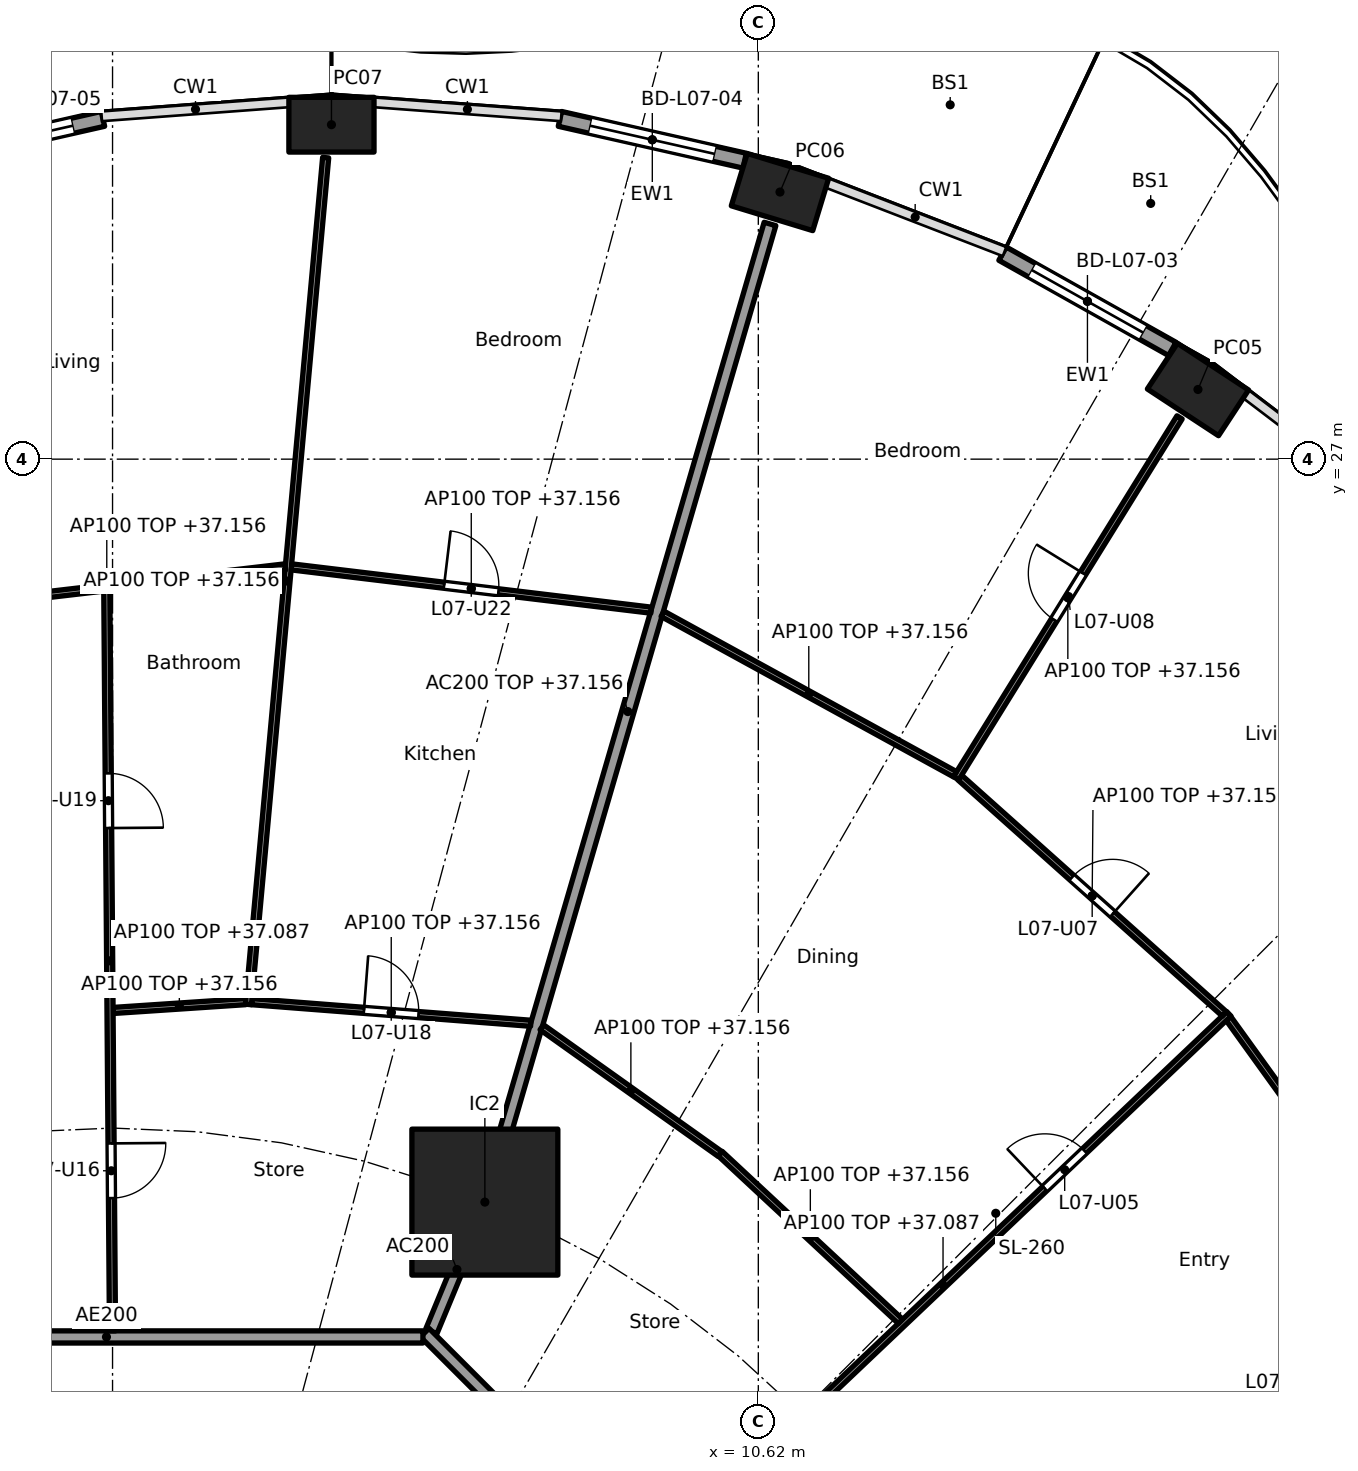
"""IFC4 building model, lengths in metres.
Left out: names, types, materials, properties, quantities, classifications, styles, units other than length and angle.
Written with IfcOpenShell. Run it as: python <this file> out.ifc"""

import sys

from ifc_helpers import new_model, si_unit, direction, frame, frame_2d, origin, origin_2d, place, context, subcontext, project, spatial, rectangle, hollow_rectangle, extrude, element, fill, save


model = new_model("IFC4")
c1 = context("Model", 3, precision=1e-05, world=origin(), true_north=direction((0.0, 1.0)))
c2 = subcontext(c1, "Body", "Model", "MODEL_VIEW")
j1 = project(units=[si_unit("LENGTHUNIT", "METRE"), si_unit("PLANEANGLEUNIT", "RADIAN")], contexts=[c1])
p1 = place(None, origin())
s1 = spatial("IfcSite", under=j1, at=p1, CompositionType="ELEMENT")
p2 = place(p1, origin())
s2 = spatial("IfcBuilding", under=s1, at=p2, CompositionType="ELEMENT")
p3 = place(p2, frame((0.0, 0.0, 34.4)))
s3 = spatial("IfcBuildingStorey", under=s2, at=p3, CompositionType="ELEMENT", Elevation=34.4)
for number, where, z_axis, x_axis in (
    (1, (17.85, 28.146, 0.0), (0.0, 0.0, 1.0), (-0.836, 0.549, 0.0)),
    (2, (10.976, 31.393, 0.0), (0.0, 0.0, 1.0), (-0.957, 0.292, 0.0)),
    (3, (3.6, 32.5, 0.0), (0.0, 0.0, 1.0), (-1.0, 0.0, 0.0)),
):
    element("IfcColumn", number, at=place(p3, frame(where, z_axis=z_axis, x_axis=x_axis)), inside=s3, PredefinedType="COLUMN", context=c2, shape_type="SweptSolid", body=[
        extrude(hollow_rectangle(XDim=1.4, YDim=0.9, WallThickness=0.05, at=origin_2d()), origin(), (0.0, 0.0, 1.0), 3.7),
    ])
p4 = place(p3, frame((6.123, 14.782, 0.0), z_axis=(0.0, 0.0, 1.0), x_axis=(1.0, 0.0, 0.0)))
e4 = element("IfcColumn", 4, at=p4, inside=s3, PredefinedType="COLUMN", context=c2, shape_type="SweptSolid", body=[
    extrude(rectangle(XDim=2.4, YDim=2.4, at=origin_2d()), origin(), (0.0, 0.0, 1.0), 3.7),
])
p5 = place(p3, frame((14.637, 30.379, 0.0), z_axis=(0.0, 0.0, 1.0), x_axis=(0.872102558443, -0.489323132048, 0.0)))
e5 = element("IfcWall", 5, at=p5, inside=s3, PredefinedType="SOLIDWALL", context=c2, shape_type="SweptSolid", body=[
    extrude(rectangle(XDim=3.201, YDim=0.25, at=frame_2d((1.601, 0.0))), origin(), (0.0, 0.0, 1.0), 3.44),
])
p6 = place(p5, frame((0.551, 0.0, 0.0)))
e6 = element("IfcOpeningElement", 6, at=p6, cuts=e5, PredefinedType="OPENING", context=c2, shape_type="SweptSolid", body=[
    extrude(rectangle(XDim=2.1, YDim=2.4, at=frame_2d((1.05, 1.2))), frame((0.0, 0.135, 0.0), z_axis=(0.0, -1.0, 0.0), x_axis=(1.0, 0.0, 0.0)), (0.0, 0.0, 1.0), 0.27),
])
p7 = place(p3, frame((7.358, 32.596, 0.0), z_axis=(0.0, 0.0, 1.0), x_axis=(0.97533495413, -0.220729987208, 0.0)))
e7 = element("IfcWall", 7, at=p7, inside=s3, PredefinedType="SOLIDWALL", context=c2, shape_type="SweptSolid", body=[
    extrude(rectangle(XDim=3.115, YDim=0.25, at=frame_2d((1.557, 0.0))), origin(), (0.0, 0.0, 1.0), 3.44),
])
p8 = place(p7, frame((0.507, 0.0, 0.0)))
e8 = element("IfcOpeningElement", 8, at=p8, cuts=e7, PredefinedType="OPENING", context=c2, shape_type="SweptSolid", body=[
    extrude(rectangle(XDim=2.1, YDim=2.4, at=frame_2d((1.05, 1.2))), frame((0.0, 0.135, 0.0), z_axis=(0.0, -1.0, 0.0), x_axis=(1.0, 0.0, 0.0)), (0.0, 0.0, 1.0), 0.27),
])
p9 = place(p3, frame((-3.195, 31.908, 0.0), z_axis=(0.0, 0.0, 1.0), x_axis=(0.975331134677, 0.220746863466, 0.0)))
e9 = element("IfcWall", 9, at=p9, inside=s3, PredefinedType="SOLIDWALL", context=c2, shape_type="SweptSolid", body=[
    extrude(rectangle(XDim=3.115, YDim=0.25, at=frame_2d((1.557, 0.0))), origin(), (0.0, 0.0, 1.0), 3.44),
])
p10 = place(p9, frame((0.507, 0.0, 0.0)))
e10 = element("IfcOpeningElement", 10, at=p10, cuts=e9, PredefinedType="OPENING", context=c2, shape_type="SweptSolid", body=[
    extrude(rectangle(XDim=2.1, YDim=2.4, at=frame_2d((1.05, 1.2))), frame((0.0, 0.135, 0.0), z_axis=(0.0, -1.0, 0.0), x_axis=(1.0, 0.0, 0.0)), (0.0, 0.0, 1.0), 0.27),
])
p11 = place(p3, frame((5.243, 12.657, 0.0), z_axis=(0.0, 0.0, 1.0), x_axis=(0.382707856524, 0.923869415315, 0.0)))
e11 = element("IfcWall", 11, at=p11, inside=s3, PredefinedType="PARTITIONING", context=c2, shape_type="SweptSolid", body=[
    extrude(rectangle(XDim=2.2, YDim=0.2, at=frame_2d((1.1, 0.0))), origin(), (0.0, 0.0, 1.0), 3.44),
])
p12 = place(p3, frame((6.137, 14.83, 0.0), z_axis=(0.0, 0.0, 1.0), x_axis=(0.27985745069, 0.960041565399, 0.0)))
e12 = element("IfcWall", 12, at=p12, inside=s3, PredefinedType="PARTITIONING", context=c2, shape_type="SweptSolid", body=[
    extrude(rectangle(XDim=16.705, YDim=0.2, at=frame_2d((8.353, 0.0))), origin(), (0.0, 0.0, 1.0), 2.756),
])
p13 = place(p3, frame((12.635, 5.134, 0.0), z_axis=(0.0, 0.0, 1.0), x_axis=(-0.707106781187, 0.707106781187, 0.0)))
e13 = element("IfcWall", 13, at=p13, inside=s3, PredefinedType="PARTITIONING", context=c2, shape_type="SweptSolid", body=[
    extrude(rectangle(XDim=10.609, YDim=0.2, at=frame_2d((5.305, 0.0))), origin(), (0.0, 0.0, 1.0), 3.44),
])
p14 = place(p13, frame((3.503, 0.0, 0.0)))
e14 = element("IfcOpeningElement", 14, at=p14, cuts=e13, PredefinedType="OPENING", context=c2, shape_type="SweptSolid", body=[
    extrude(rectangle(XDim=1.0, YDim=2.1, at=frame_2d((0.5, 1.05))), frame((0.0, 0.11, 0.0), z_axis=(0.0, -1.0, 0.0), x_axis=(1.0, 0.0, 0.0)), (0.0, 0.0, 1.0), 0.22),
])
p15 = place(p3, frame((5.104, 12.565, 0.0), z_axis=(0.0, 0.0, 1.0), x_axis=(-1.0, 0.0, 0.0)))
e15 = element("IfcWall", 15, at=p15, inside=s3, PredefinedType="PARTITIONING", context=c2, shape_type="SweptSolid", body=[
    extrude(rectangle(XDim=10.409, YDim=0.2, at=frame_2d((5.205, 0.0))), origin(), (0.0, 0.0, 1.0), 3.44),
])
p16 = place(p15, frame((6.339, 0.0, 0.0)))
e16 = element("IfcOpeningElement", 16, at=p16, cuts=e15, PredefinedType="OPENING", context=c2, shape_type="SweptSolid", body=[
    extrude(rectangle(XDim=1.0, YDim=2.1, at=frame_2d((0.5, 1.05))), frame((0.0, 0.11, 0.0), z_axis=(0.0, -1.0, 0.0), x_axis=(1.0, 0.0, 0.0)), (0.0, 0.0, 1.0), 0.22),
])
p17 = place(p3, frame((16.635, 8.078, 0.0), z_axis=(0.0, 0.0, 1.0), x_axis=(0.949412285442, 0.314032342684, 0.0)))
e17 = element("IfcWall", 17, at=p17, inside=s3, PredefinedType="PARTITIONING", context=c2, shape_type="SweptSolid", body=[
    extrude(rectangle(XDim=14.451, YDim=0.1, at=frame_2d((7.226, 0.0))), origin(), (0.0, 0.0, 1.0), 2.837),
])
p18 = place(p3, frame((10.813, 7.091, 0.0), z_axis=(0.0, 0.0, 1.0), x_axis=(0.885182649479, 0.465243674928, 0.0)))
e18 = element("IfcWall", 18, at=p18, inside=s3, PredefinedType="PARTITIONING", context=c2, shape_type="SweptSolid", body=[
    extrude(rectangle(XDim=12.551, YDim=0.1, at=frame_2d((6.275, 0.0))), origin(), (0.0, 0.0, 1.0), 2.687),
])
p19 = place(p18, frame((0.539, 0.0, 0.0)))
e19 = element("IfcOpeningElement", 19, at=p19, cuts=e18, PredefinedType="OPENING", context=c2, shape_type="SweptSolid", body=[
    extrude(rectangle(XDim=0.9, YDim=2.1, at=frame_2d((0.45, 1.05))), frame((0.0, 0.06, 0.0), z_axis=(0.0, -1.0, 0.0), x_axis=(1.0, 0.0, 0.0)), (0.0, 0.0, 1.0), 0.12),
])
p20 = place(p18, frame((8.494, 0.0, 0.0)))
e20 = element("IfcOpeningElement", 20, at=p20, cuts=e18, PredefinedType="OPENING", context=c2, shape_type="SweptSolid", body=[
    extrude(rectangle(XDim=0.9, YDim=2.1, at=frame_2d((0.45, 1.05))), frame((0.0, 0.06, 0.0), z_axis=(0.0, -1.0, 0.0), x_axis=(1.0, 0.0, 0.0)), (0.0, 0.0, 1.0), 0.12),
])
p21 = place(p3, frame((21.849, 12.948, 0.0), z_axis=(0.0, 0.0, 1.0), x_axis=(-0.584563700282, 0.811347817099, 0.0)))
e21 = element("IfcWall", 21, at=p21, inside=s3, PredefinedType="PARTITIONING", context=c2, shape_type="SweptSolid", body=[
    extrude(rectangle(XDim=5.984, YDim=0.1, at=frame_2d((2.992, 0.0))), origin(), (0.0, 0.0, 1.0), 2.756),
])
p22 = place(p21, frame((1.046, 0.0, 0.0)))
e22 = element("IfcOpeningElement", 22, at=p22, cuts=e21, PredefinedType="OPENING", context=c2, shape_type="SweptSolid", body=[
    extrude(rectangle(XDim=0.9, YDim=2.1, at=frame_2d((0.45, 1.05))), frame((0.0, 0.06, 0.0), z_axis=(0.0, -1.0, 0.0), x_axis=(1.0, 0.0, 0.0)), (0.0, 0.0, 1.0), 0.12),
])
p23 = place(p3, frame((8.957, 8.953, 0.0), z_axis=(0.0, 0.0, 1.0), x_axis=(0.725250022034, 0.688485588476, 0.0)))
e23 = element("IfcWall", 23, at=p23, inside=s3, PredefinedType="PARTITIONING", context=c2, shape_type="SweptSolid", body=[
    extrude(rectangle(XDim=12.963, YDim=0.1, at=frame_2d((6.481, 0.0))), origin(), (0.0, 0.0, 1.0), 2.687),
])
p24 = place(p23, frame((2.333, 0.0, 0.0)))
e24 = element("IfcOpeningElement", 24, at=p24, cuts=e23, PredefinedType="OPENING", context=c2, shape_type="SweptSolid", body=[
    extrude(rectangle(XDim=0.9, YDim=2.1, at=frame_2d((0.45, 1.05))), frame((0.0, 0.06, 0.0), z_axis=(0.0, -1.0, 0.0), x_axis=(1.0, 0.0, 0.0)), (0.0, 0.0, 1.0), 0.12),
])
p25 = place(p23, frame((8.79, 0.0, 0.0)))
e25 = element("IfcOpeningElement", 25, at=p25, cuts=e23, PredefinedType="OPENING", context=c2, shape_type="SweptSolid", body=[
    extrude(rectangle(XDim=0.9, YDim=2.1, at=frame_2d((0.45, 1.05))), frame((0.0, 0.06, 0.0), z_axis=(0.0, -1.0, 0.0), x_axis=(1.0, 0.0, 0.0)), (0.0, 0.0, 1.0), 0.12),
])
p26 = place(p3, frame((12.958, 12.82, 0.0), z_axis=(0.0, 0.0, 1.0), x_axis=(-0.732028724098, 0.681273768096, 0.0)))
e26 = element("IfcWall", 26, at=p26, inside=s3, PredefinedType="PARTITIONING", context=c2, shape_type="SweptSolid", body=[
    extrude(rectangle(XDim=4.05, YDim=0.1, at=frame_2d((2.025, 0.0))), origin(), (0.0, 0.0, 1.0), 2.756),
])
p27 = place(p3, frame((18.285, 17.877, 0.0), z_axis=(0.0, 0.0, 1.0), x_axis=(-0.745806142791, 0.666163041136, 0.0)))
e27 = element("IfcWall", 27, at=p27, inside=s3, PredefinedType="PARTITIONING", context=c2, shape_type="SweptSolid", body=[
    extrude(rectangle(XDim=5.831, YDim=0.1, at=frame_2d((2.915, 0.0))), origin(), (0.0, 0.0, 1.0), 2.756),
])
p28 = place(p27, frame((2.465, 0.0, 0.0)))
e28 = element("IfcOpeningElement", 28, at=p28, cuts=e27, PredefinedType="OPENING", context=c2, shape_type="SweptSolid", body=[
    extrude(rectangle(XDim=0.9, YDim=2.1, at=frame_2d((0.45, 1.05))), frame((0.0, 0.06, 0.0), z_axis=(0.0, -1.0, 0.0), x_axis=(1.0, 0.0, 0.0)), (0.0, 0.0, 1.0), 0.12),
])
p29 = place(p3, frame((9.989, 15.574, 0.0), z_axis=(0.0, 0.0, 1.0), x_axis=(-0.81492039338, 0.57957290521, 0.0)))
e29 = element("IfcWall", 29, at=p29, inside=s3, PredefinedType="PARTITIONING", context=c2, shape_type="SweptSolid", body=[
    extrude(rectangle(XDim=3.594, YDim=0.1, at=frame_2d((1.797, 0.0))), origin(), (0.0, 0.0, 1.0), 2.756),
])
p30 = place(p3, frame((13.873, 21.752, 0.0), z_axis=(0.0, 0.0, 1.0), x_axis=(0.52644491616, 0.850209239099, 0.0)))
e30 = element("IfcWall", 30, at=p30, inside=s3, PredefinedType="PARTITIONING", context=c2, shape_type="SweptSolid", body=[
    extrude(rectangle(XDim=6.98, YDim=0.1, at=frame_2d((3.49, 0.0))), origin(), (0.0, 0.0, 1.0), 2.756),
])
p31 = place(p30, frame((3.065, 0.0, 0.0)))
e31 = element("IfcOpeningElement", 31, at=p31, cuts=e30, PredefinedType="OPENING", context=c2, shape_type="SweptSolid", body=[
    extrude(rectangle(XDim=0.9, YDim=2.1, at=frame_2d((0.45, 1.05))), frame((0.0, 0.06, 0.0), z_axis=(0.0, -1.0, 0.0), x_axis=(1.0, 0.0, 0.0)), (0.0, 0.0, 1.0), 0.12),
])
p32 = place(p3, frame((13.855, 21.818, 0.0), z_axis=(0.0, 0.0, 1.0), x_axis=(-0.876809987787, 0.480837025734, 0.0)))
e32 = element("IfcWall", 32, at=p32, inside=s3, PredefinedType="PARTITIONING", context=c2, shape_type="SweptSolid", body=[
    extrude(rectangle(XDim=5.486, YDim=0.1, at=frame_2d((2.743, 0.0))), origin(), (0.0, 0.0, 1.0), 2.756),
])
p33 = place(p3, frame((6.878, 17.723, 0.0), z_axis=(0.0, 0.0, 1.0), x_axis=(-0.99701850123, 0.077162868047, 0.0)))
e33 = element("IfcWall", 33, at=p33, inside=s3, PredefinedType="PARTITIONING", context=c2, shape_type="SweptSolid", body=[
    extrude(rectangle(XDim=4.604, YDim=0.1, at=frame_2d((2.302, 0.0))), origin(), (0.0, 0.0, 1.0), 2.756),
])
p34 = place(p33, frame((1.852, 0.0, 0.0)))
e34 = element("IfcOpeningElement", 34, at=p34, cuts=e33, PredefinedType="OPENING", context=c2, shape_type="SweptSolid", body=[
    extrude(rectangle(XDim=0.9, YDim=2.1, at=frame_2d((0.45, 1.05))), frame((0.0, 0.06, 0.0), z_axis=(0.0, -1.0, 0.0), x_axis=(1.0, 0.0, 0.0)), (0.0, 0.0, 1.0), 0.12),
])
p35 = place(p3, frame((8.858, 24.516, 0.0), z_axis=(0.0, 0.0, 1.0), x_axis=(-0.992834127896, 0.119500604542, 0.0)))
e35 = element("IfcWall", 35, at=p35, inside=s3, PredefinedType="PARTITIONING", context=c2, shape_type="SweptSolid", body=[
    extrude(rectangle(XDim=5.959, YDim=0.1, at=frame_2d((2.98, 0.0))), origin(), (0.0, 0.0, 1.0), 2.756),
])
p36 = place(p35, frame((2.53, 0.0, 0.0)))
e36 = element("IfcOpeningElement", 36, at=p36, cuts=e35, PredefinedType="OPENING", context=c2, shape_type="SweptSolid", body=[
    extrude(rectangle(XDim=0.9, YDim=2.1, at=frame_2d((0.45, 1.05))), frame((0.0, 0.06, 0.0), z_axis=(0.0, -1.0, 0.0), x_axis=(1.0, 0.0, 0.0)), (0.0, 0.0, 1.0), 0.12),
])
p37 = place(p3, frame((2.234, 18.032, 0.0), z_axis=(0.0, 0.0, 1.0), x_axis=(0.090891502968, 0.995860800859, 0.0)))
e37 = element("IfcWall", 37, at=p37, inside=s3, PredefinedType="PARTITIONING", context=c2, shape_type="SweptSolid", body=[
    extrude(rectangle(XDim=13.984, YDim=0.1, at=frame_2d((6.992, 0.0))), origin(), (0.0, 0.0, 1.0), 2.756),
])
p38 = place(p3, frame((2.188, 18.079, 0.0), z_axis=(0.0, 0.0, 1.0), x_axis=(-0.997794542617, -0.066378089183, 0.0)))
e38 = element("IfcWall", 38, at=p38, inside=s3, PredefinedType="PARTITIONING", context=c2, shape_type="SweptSolid", body=[
    extrude(rectangle(XDim=2.185, YDim=0.1, at=frame_2d((1.092, 0.0))), origin(), (0.0, 0.0, 1.0), 2.756),
])
p39 = place(p3, frame((2.842, 25.229, 0.0), z_axis=(0.0, 0.0, 1.0), x_axis=(-0.993255612046, -0.115945198862, 0.0)))
e39 = element("IfcWall", 39, at=p39, inside=s3, PredefinedType="PARTITIONING", context=c2, shape_type="SweptSolid", body=[
    extrude(rectangle(XDim=5.913, YDim=0.1, at=frame_2d((2.956, 0.0))), origin(), (0.0, 0.0, 1.0), 2.756),
])
p40 = place(p3, frame((-0.001, 12.665, 0.0), z_axis=(0.0, 0.0, 1.0), x_axis=(-0.007702417287, 0.999970335944, 0.0)))
e40 = element("IfcWall", 40, at=p40, inside=s3, PredefinedType="PARTITIONING", context=c2, shape_type="SweptSolid", body=[
    extrude(rectangle(XDim=12.171, YDim=0.1, at=frame_2d((6.086, 0.0))), origin(), (0.0, 0.0, 1.0), 2.687),
])
p41 = place(p40, frame((2.183, 0.0, 0.0)))
e41 = element("IfcOpeningElement", 41, at=p41, cuts=e40, PredefinedType="OPENING", context=c2, shape_type="SweptSolid", body=[
    extrude(rectangle(XDim=0.9, YDim=2.1, at=frame_2d((0.45, 1.05))), frame((0.0, 0.06, 0.0), z_axis=(0.0, -1.0, 0.0), x_axis=(1.0, 0.0, 0.0)), (0.0, 0.0, 1.0), 0.12),
])
p42 = place(p40, frame((8.269, 0.0, 0.0)))
e42 = element("IfcOpeningElement", 42, at=p42, cuts=e40, PredefinedType="OPENING", context=c2, shape_type="SweptSolid", body=[
    extrude(rectangle(XDim=0.9, YDim=2.1, at=frame_2d((0.45, 1.05))), frame((0.0, 0.06, 0.0), z_axis=(0.0, -1.0, 0.0), x_axis=(1.0, 0.0, 0.0)), (0.0, 0.0, 1.0), 0.12),
])
p43 = place(p6, origin())
e43 = element("IfcDoor", 43, at=p43, inside=s3, OperationType="SLIDING_TO_LEFT", PredefinedType="DOOR", context=c2, shape_type="SweptSolid", body=[
    extrude(rectangle(XDim=2.1, YDim=2.4, at=frame_2d((1.05, 1.2))), frame((0.0, 0.025, 0.0), z_axis=(0.0, -1.0, 0.0), x_axis=(1.0, 0.0, 0.0)), (0.0, 0.0, 1.0), 0.05),
])
fill(e6, e43)
p44 = place(p8, origin())
e44 = element("IfcDoor", 44, at=p44, inside=s3, OperationType="SLIDING_TO_LEFT", PredefinedType="DOOR", context=c2, shape_type="SweptSolid", body=[
    extrude(rectangle(XDim=2.1, YDim=2.4, at=frame_2d((1.05, 1.2))), frame((0.0, 0.025, 0.0), z_axis=(0.0, -1.0, 0.0), x_axis=(1.0, 0.0, 0.0)), (0.0, 0.0, 1.0), 0.05),
])
fill(e8, e44)
p45 = place(p10, origin())
e45 = element("IfcDoor", 45, at=p45, inside=s3, OperationType="SLIDING_TO_LEFT", PredefinedType="DOOR", context=c2, shape_type="SweptSolid", body=[
    extrude(rectangle(XDim=2.1, YDim=2.4, at=frame_2d((1.05, 1.2))), frame((0.0, 0.025, 0.0), z_axis=(0.0, -1.0, 0.0), x_axis=(1.0, 0.0, 0.0)), (0.0, 0.0, 1.0), 0.05),
])
fill(e10, e45)
p46 = place(p25, origin())
e46 = element("IfcDoor", 46, at=p46, inside=s3, OperationType="SINGLE_SWING_LEFT", PredefinedType="DOOR", context=c2, shape_type="SweptSolid", body=[
    extrude(rectangle(XDim=0.9, YDim=2.1, at=frame_2d((0.45, 1.05))), frame((0.0, 0.025, 0.0), z_axis=(0.0, -1.0, 0.0), x_axis=(1.0, 0.0, 0.0)), (0.0, 0.0, 1.0), 0.05),
])
fill(e25, e46)
p47 = place(p28, frame((0.9, 0.0, 0.0), x_axis=(-1.0, 0.0, 0.0)))
e47 = element("IfcDoor", 47, at=p47, inside=s3, OperationType="SINGLE_SWING_RIGHT", PredefinedType="DOOR", context=c2, shape_type="SweptSolid", body=[
    extrude(rectangle(XDim=0.9, YDim=2.1, at=frame_2d((0.45, 1.05))), frame((0.0, 0.025, 0.0), z_axis=(0.0, -1.0, 0.0), x_axis=(1.0, 0.0, 0.0)), (0.0, 0.0, 1.0), 0.05),
])
fill(e28, e47)
p48 = place(p31, origin())
e48 = element("IfcDoor", 48, at=p48, inside=s3, OperationType="SINGLE_SWING_RIGHT", PredefinedType="DOOR", context=c2, shape_type="SweptSolid", body=[
    extrude(rectangle(XDim=0.9, YDim=2.1, at=frame_2d((0.45, 1.05))), frame((0.0, 0.025, 0.0), z_axis=(0.0, -1.0, 0.0), x_axis=(1.0, 0.0, 0.0)), (0.0, 0.0, 1.0), 0.05),
])
fill(e31, e48)
p49 = place(p41, frame((0.9, 0.0, 0.0), x_axis=(-1.0, 0.0, 0.0)))
e49 = element("IfcDoor", 49, at=p49, inside=s3, OperationType="SINGLE_SWING_LEFT", PredefinedType="DOOR", context=c2, shape_type="SweptSolid", body=[
    extrude(rectangle(XDim=0.9, YDim=2.1, at=frame_2d((0.45, 1.05))), frame((0.0, 0.025, 0.0), z_axis=(0.0, -1.0, 0.0), x_axis=(1.0, 0.0, 0.0)), (0.0, 0.0, 1.0), 0.05),
])
fill(e41, e49)
p50 = place(p34, frame((0.9, 0.0, 0.0), x_axis=(-1.0, 0.0, 0.0)))
e50 = element("IfcDoor", 50, at=p50, inside=s3, OperationType="SINGLE_SWING_LEFT", PredefinedType="DOOR", context=c2, shape_type="SweptSolid", body=[
    extrude(rectangle(XDim=0.9, YDim=2.1, at=frame_2d((0.45, 1.05))), frame((0.0, 0.025, 0.0), z_axis=(0.0, -1.0, 0.0), x_axis=(1.0, 0.0, 0.0)), (0.0, 0.0, 1.0), 0.05),
])
fill(e34, e50)
p51 = place(p42, frame((0.9, 0.0, 0.0), x_axis=(-1.0, 0.0, 0.0)))
e51 = element("IfcDoor", 51, at=p51, inside=s3, OperationType="SINGLE_SWING_RIGHT", PredefinedType="DOOR", context=c2, shape_type="SweptSolid", body=[
    extrude(rectangle(XDim=0.9, YDim=2.1, at=frame_2d((0.45, 1.05))), frame((0.0, 0.025, 0.0), z_axis=(0.0, -1.0, 0.0), x_axis=(1.0, 0.0, 0.0)), (0.0, 0.0, 1.0), 0.05),
])
fill(e42, e51)
p52 = place(p36, frame((0.9, 0.0, 0.0), x_axis=(-1.0, 0.0, 0.0)))
e52 = element("IfcDoor", 52, at=p52, inside=s3, OperationType="SINGLE_SWING_LEFT", PredefinedType="DOOR", context=c2, shape_type="SweptSolid", body=[
    extrude(rectangle(XDim=0.9, YDim=2.1, at=frame_2d((0.45, 1.05))), frame((0.0, 0.025, 0.0), z_axis=(0.0, -1.0, 0.0), x_axis=(1.0, 0.0, 0.0)), (0.0, 0.0, 1.0), 0.05),
])
fill(e36, e52)
save(model, sys.argv[1])
